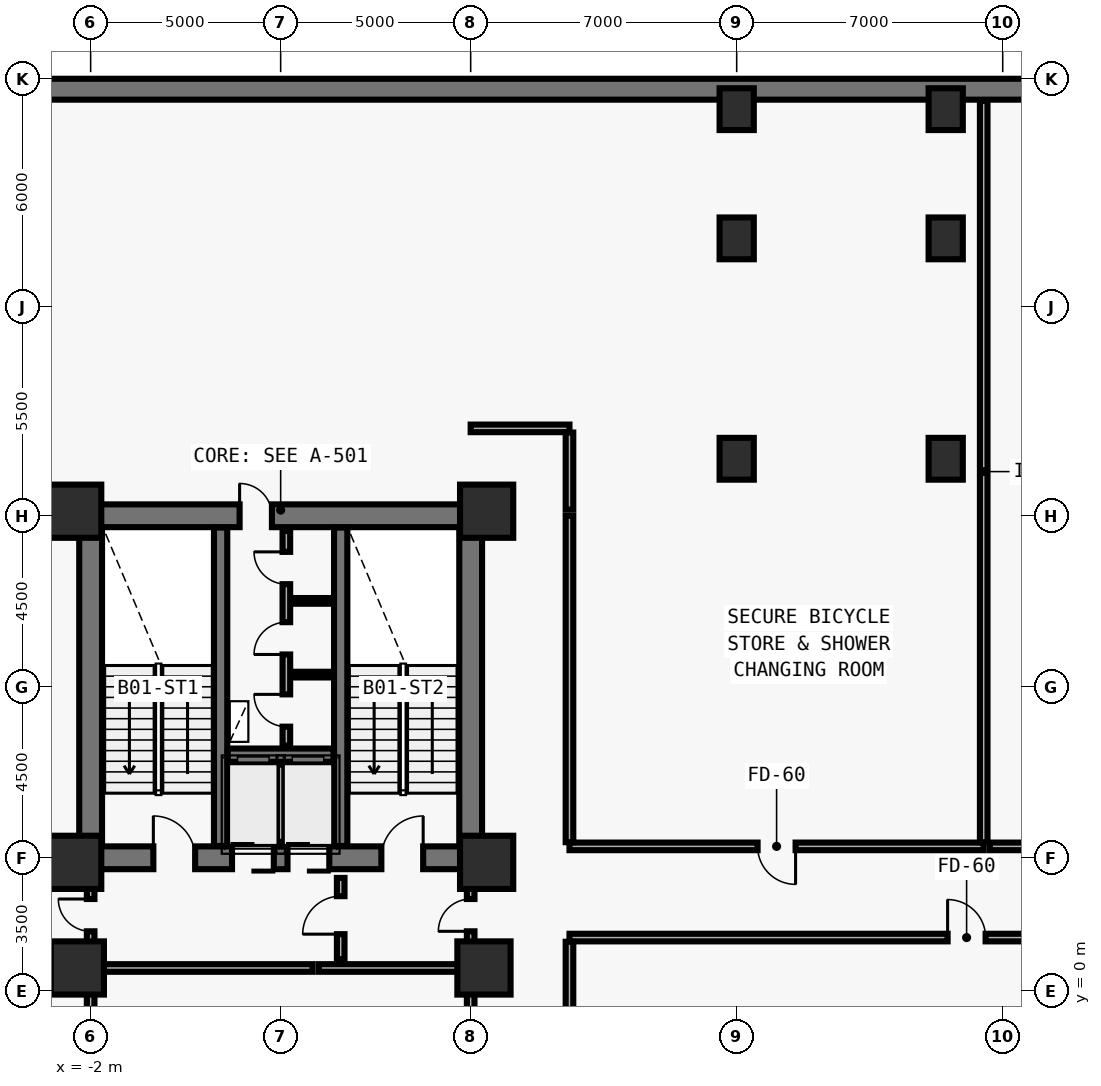
"""IFC4 building model, lengths in metres.
Left out: names, types, materials, properties, quantities, classifications, styles, units other than length and angle.
Written with IfcOpenShell. Run it as: python <this file> out.ifc"""

import sys

from ifc_helpers import new_model, si_unit, direction, frame, frame_2d, origin, origin_2d, place, context, subcontext, project, spatial, rectangle, extrude, element, fill, save


model = new_model("IFC4")
c1 = context("Model", 3, precision=1e-05, world=origin(), true_north=direction((0.0, 1.0)))
c2 = subcontext(c1, "Body", "Model", "MODEL_VIEW")
j1 = project(units=[si_unit("LENGTHUNIT", "METRE"), si_unit("PLANEANGLEUNIT", "RADIAN")], contexts=[c1])
p1 = place(None, origin())
s1 = spatial("IfcSite", under=j1, at=p1, CompositionType="ELEMENT")
p2 = place(p1, origin())
s2 = spatial("IfcBuilding", under=s1, at=p2, CompositionType="ELEMENT")
p3 = place(p2, frame((0.0, 0.0, -4.5)))
s3 = spatial("IfcBuildingStorey", under=s2, at=p3, CompositionType="ELEMENT", Elevation=-4.5)
p4 = place(p3, frame((-2.0, 3.5, 0.0), z_axis=(0.0, 0.0, 1.0), x_axis=(1.0, 0.0, 0.0)))
e1 = element("IfcWall", 1, at=p4, inside=s3, PredefinedType="SHEAR", context=c2, shape_type="SweptSolid", body=[
    extrude(rectangle(XDim=10.0, YDim=0.6, at=frame_2d((5.0, 0.0))), origin(), (0.0, 0.0, 1.0), 4.492),
])
p5 = place(p4, frame((1.65, 0.0, 0.0)))
e2 = element("IfcOpeningElement", 2, at=p5, cuts=e1, PredefinedType="OPENING", context=c2, shape_type="SweptSolid", body=[
    extrude(rectangle(XDim=1.1, YDim=2.15, at=frame_2d((0.55, 1.075))), frame((0.0, 0.31, 0.0), z_axis=(0.0, -1.0, 0.0), x_axis=(1.0, 0.0, 0.0)), (0.0, 0.0, 1.0), 0.62),
])
p6 = place(p4, frame((7.65, 0.0, 0.0)))
e3 = element("IfcOpeningElement", 3, at=p6, cuts=e1, PredefinedType="OPENING", context=c2, shape_type="SweptSolid", body=[
    extrude(rectangle(XDim=1.1, YDim=2.15, at=frame_2d((0.55, 1.075))), frame((0.0, 0.31, 0.0), z_axis=(0.0, -1.0, 0.0), x_axis=(1.0, 0.0, 0.0)), (0.0, 0.0, 1.0), 0.62),
])
p7 = place(p4, frame((3.72, 0.0, 0.0)))
e4 = element("IfcOpeningElement", 4, at=p7, cuts=e1, PredefinedType="OPENING", context=c2, shape_type="SweptSolid", body=[
    extrude(rectangle(XDim=1.1, YDim=2.2, at=frame_2d((0.55, 1.1))), frame((0.0, 0.31, 0.0), z_axis=(0.0, -1.0, 0.0), x_axis=(1.0, 0.0, 0.0)), (0.0, 0.0, 1.0), 0.62),
])
p8 = place(p4, frame((5.18, 0.0, 0.0)))
e5 = element("IfcOpeningElement", 5, at=p8, cuts=e1, PredefinedType="OPENING", context=c2, shape_type="SweptSolid", body=[
    extrude(rectangle(XDim=1.1, YDim=2.2, at=frame_2d((0.55, 1.1))), frame((0.0, 0.31, 0.0), z_axis=(0.0, -1.0, 0.0), x_axis=(1.0, 0.0, 0.0)), (0.0, 0.0, 1.0), 0.62),
])
p9 = place(p3, frame((-2.0, 12.5, 0.0), z_axis=(0.0, 0.0, 1.0), x_axis=(1.0, 0.0, 0.0)))
e6 = element("IfcWall", 6, at=p9, inside=s3, PredefinedType="SHEAR", context=c2, shape_type="SweptSolid", body=[
    extrude(rectangle(XDim=10.0, YDim=0.6, at=frame_2d((5.0, 0.0))), origin(), (0.0, 0.0, 1.0), 4.492),
])
p10 = place(p9, frame((3.92, 0.0, 0.0)))
e7 = element("IfcOpeningElement", 7, at=p10, cuts=e6, PredefinedType="OPENING", context=c2, shape_type="SweptSolid", body=[
    extrude(rectangle(XDim=0.85, YDim=2.1, at=frame_2d((0.425, 1.05))), frame((0.0, 0.31, 0.0), z_axis=(0.0, -1.0, 0.0), x_axis=(1.0, 0.0, 0.0)), (0.0, 0.0, 1.0), 0.62),
])
for number, where, z_axis, x_axis in (
    (8, (-2.0, 3.81, 0.0), (0.0, 0.0, 1.0), (0.0, 1.0, 0.0)),
    (9, (8.0, 3.81, 0.0), (0.0, 0.0, 1.0), (0.0, 1.0, 0.0)),
):
    element("IfcWall", number, at=place(p3, frame(where, z_axis=z_axis, x_axis=x_axis)), inside=s3, PredefinedType="SHEAR", context=c2, shape_type="SweptSolid", body=[
        extrude(rectangle(XDim=8.38, YDim=0.6, at=frame_2d((4.19, 0.0))), origin(), (0.0, 0.0, 1.0), 4.492),
    ])
for number, where, z_axis, x_axis in (
    (10, (1.42, 3.81, 0.0), (0.0, 0.0, 1.0), (0.0, 1.0, 0.0)),
    (11, (4.58, 3.81, 0.0), (0.0, 0.0, 1.0), (0.0, 1.0, 0.0)),
):
    element("IfcWall", number, at=place(p3, frame(where, z_axis=z_axis, x_axis=x_axis)), inside=s3, PredefinedType="SHEAR", context=c2, shape_type="SweptSolid", body=[
        extrude(rectangle(XDim=8.38, YDim=0.35, at=frame_2d((4.19, 0.0))), origin(), (0.0, 0.0, 1.0), 4.492),
    ])
p11 = place(p3, frame((1.61, 6.2, 0.0), z_axis=(0.0, 0.0, 1.0), x_axis=(1.0, 0.0, 0.0)))
e12 = element("IfcWall", 12, at=p11, inside=s3, PredefinedType="SHEAR", context=c2, shape_type="SweptSolid", body=[
    extrude(rectangle(XDim=2.78, YDim=0.35, at=frame_2d((1.39, 0.0))), origin(), (0.0, 0.0, 1.0), 4.492),
])
p12 = place(p3, frame((-33.725, 23.725, 0.0), z_axis=(0.0, 0.0, 1.0), x_axis=(1.0, 0.0, 0.0)))
e13 = element("IfcWall", 13, at=p12, inside=s3, PredefinedType="SOLIDWALL", context=c2, shape_type="SweptSolid", body=[
    extrude(rectangle(XDim=67.45, YDim=0.55, at=frame_2d((33.725, 0.0))), origin(), (0.0, 0.0, 1.0), 4.492),
])
for number, where, z_axis, x_axis in (
    (14, (-2.42, 12.62, 0.0), (0.0, 0.0, 1.0), (1.0, 0.0, 0.0)),
    (15, (8.42, 12.62, 0.0), (0.0, 0.0, 1.0), (1.0, 0.0, 0.0)),
    (16, (-2.42, 3.38, 0.0), (0.0, 0.0, 1.0), (1.0, 0.0, 0.0)),
    (17, (8.42, 3.38, 0.0), (0.0, 0.0, 1.0), (1.0, 0.0, 0.0)),
    (18, (-2.35, 0.6, 0.0), (0.0, 0.0, 1.0), (1.0, 0.0, 0.0)),
    (19, (8.35, 0.6, 0.0), (0.0, 0.0, 1.0), (1.0, 0.0, 0.0)),
):
    element("IfcColumn", number, at=place(p3, frame(where, z_axis=z_axis, x_axis=x_axis)), inside=s3, PredefinedType="COLUMN", context=c2, shape_type="SweptSolid", body=[
        extrude(rectangle(XDim=1.4, YDim=1.4, at=origin_2d()), origin(), (0.0, 0.0, 1.0), 4.475),
    ])
for number, where, z_axis, x_axis in (
    (20, (15.0, 14.0, 0.0), (0.0, 0.0, 1.0), (1.0, 0.0, 0.0)),
    (21, (15.0, 19.8, 0.0), (0.0, 0.0, 1.0), (1.0, 0.0, 0.0)),
    (22, (15.0, 23.2, 0.0), (0.0, 0.0, 1.0), (1.0, 0.0, 0.0)),
    (23, (20.5, 14.0, 0.0), (0.0, 0.0, 1.0), (1.0, 0.0, 0.0)),
    (24, (20.5, 19.8, 0.0), (0.0, 0.0, 1.0), (1.0, 0.0, 0.0)),
    (25, (20.5, 23.2, 0.0), (0.0, 0.0, 1.0), (1.0, 0.0, 0.0)),
):
    element("IfcColumn", number, at=place(p3, frame(where, z_axis=z_axis, x_axis=x_axis)), inside=s3, PredefinedType="COLUMN", context=c2, shape_type="SweptSolid", body=[
        extrude(rectangle(XDim=0.9, YDim=1.1, at=origin_2d()), origin(), (0.0, 0.0, 1.0), 4.475),
    ])
p13 = place(p3, frame((3.0, 3.92, 0.0), z_axis=(0.0, 0.0, 1.0), x_axis=(0.0, 1.0, 0.0)))
e26 = element("IfcWall", 26, at=p13, inside=s3, PredefinedType="SOLIDWALL", context=c2, shape_type="SweptSolid", body=[
    extrude(rectangle(XDim=2.03, YDim=0.2, at=frame_2d((1.015, 0.0))), origin(), (0.0, 0.0, 1.0), 4.18),
])
p14 = place(p3, frame((4.0, 0.6, 0.0), z_axis=(0.0, 0.0, 1.0), x_axis=(1.0, 0.0, 0.0)))
e27 = element("IfcWall", 27, at=p14, inside=s3, PredefinedType="SOLIDWALL", context=c2, shape_type="SweptSolid", body=[
    extrude(rectangle(XDim=3.88, YDim=0.2, at=frame_2d((1.94, 0.0))), origin(), (0.0, 0.0, 1.0), 3.362),
])
p15 = place(p3, frame((3.15, 6.45, 0.0), z_axis=(0.0, 0.0, 1.0), x_axis=(0.0, 1.0, 0.0)))
e28 = element("IfcWall", 28, at=p15, inside=s3, PredefinedType="MOVABLE", context=c2, shape_type="SweptSolid", body=[
    extrude(rectangle(XDim=5.65, YDim=0.2, at=frame_2d((2.825, 0.0))), origin(), (0.0, 0.0, 1.0), 4.18),
])
p16 = place(p15, frame((0.5, 0.0, 0.0)))
e29 = element("IfcOpeningElement", 29, at=p16, cuts=e28, PredefinedType="OPENING", context=c2, shape_type="SweptSolid", body=[
    extrude(rectangle(XDim=0.85, YDim=2.1, at=frame_2d((0.425, 1.05))), frame((0.0, 0.11, 0.0), z_axis=(0.0, -1.0, 0.0), x_axis=(1.0, 0.0, 0.0)), (0.0, 0.0, 1.0), 0.22),
])
p17 = place(p15, frame((2.4, 0.0, 0.0)))
e30 = element("IfcOpeningElement", 30, at=p17, cuts=e28, PredefinedType="OPENING", context=c2, shape_type="SweptSolid", body=[
    extrude(rectangle(XDim=0.85, YDim=2.1, at=frame_2d((0.425, 1.05))), frame((0.0, 0.11, 0.0), z_axis=(0.0, -1.0, 0.0), x_axis=(1.0, 0.0, 0.0)), (0.0, 0.0, 1.0), 0.22),
])
p18 = place(p15, frame((4.25, 0.0, 0.0)))
e31 = element("IfcOpeningElement", 31, at=p18, cuts=e28, PredefinedType="OPENING", context=c2, shape_type="SweptSolid", body=[
    extrude(rectangle(XDim=0.85, YDim=2.1, at=frame_2d((0.425, 1.05))), frame((0.0, 0.11, 0.0), z_axis=(0.0, -1.0, 0.0), x_axis=(1.0, 0.0, 0.0)), (0.0, 0.0, 1.0), 0.22),
])
p19 = place(p3, frame((4.58, 0.83, 0.0), z_axis=(0.0, 0.0, 1.0), x_axis=(0.0, 1.0, 0.0)))
e32 = element("IfcWall", 32, at=p19, inside=s3, PredefinedType="MOVABLE", context=c2, shape_type="SweptSolid", body=[
    extrude(rectangle(XDim=2.14, YDim=0.2, at=frame_2d((1.07, 0.0))), origin(), (0.0, 0.0, 1.0), 4.18),
])
p20 = place(p19, frame((0.66, 0.0, 0.0)))
e33 = element("IfcOpeningElement", 33, at=p20, cuts=e32, PredefinedType="OPENING", context=c2, shape_type="SweptSolid", body=[
    extrude(rectangle(XDim=1.0, YDim=2.1, at=frame_2d((0.5, 1.05))), frame((0.0, 0.11, 0.0), z_axis=(0.0, -1.0, 0.0), x_axis=(1.0, 0.0, 0.0)), (0.0, 0.0, 1.0), 0.22),
])
p21 = place(p3, frame((-2.0, 0.72, 0.0), z_axis=(0.0, 0.0, 1.0), x_axis=(0.0, 1.0, 0.0)))
e34 = element("IfcWall", 34, at=p21, inside=s3, PredefinedType="MOVABLE", context=c2, shape_type="SweptSolid", body=[
    extrude(rectangle(XDim=2.25, YDim=0.2, at=frame_2d((1.125, 0.0))), origin(), (0.0, 0.0, 1.0), 3.262),
])
p22 = place(p21, frame((0.845, 0.0, 0.0)))
e35 = element("IfcOpeningElement", 35, at=p22, cuts=e34, PredefinedType="OPENING", context=c2, shape_type="SweptSolid", body=[
    extrude(rectangle(XDim=0.85, YDim=2.1, at=frame_2d((0.425, 1.05))), frame((0.0, 0.11, 0.0), z_axis=(0.0, -1.0, 0.0), x_axis=(1.0, 0.0, 0.0)), (0.0, 0.0, 1.0), 0.22),
])
p23 = place(p3, frame((8.0, 0.72, 0.0), z_axis=(0.0, 0.0, 1.0), x_axis=(0.0, 1.0, 0.0)))
e36 = element("IfcWall", 36, at=p23, inside=s3, PredefinedType="MOVABLE", context=c2, shape_type="SweptSolid", body=[
    extrude(rectangle(XDim=2.25, YDim=0.2, at=frame_2d((1.125, 0.0))), origin(), (0.0, 0.0, 1.0), 3.262),
])
p24 = place(p23, frame((0.845, 0.0, 0.0)))
e37 = element("IfcOpeningElement", 37, at=p24, cuts=e36, PredefinedType="OPENING", context=c2, shape_type="SweptSolid", body=[
    extrude(rectangle(XDim=0.85, YDim=2.1, at=frame_2d((0.425, 1.05))), frame((0.0, 0.11, 0.0), z_axis=(0.0, -1.0, 0.0), x_axis=(1.0, 0.0, 0.0)), (0.0, 0.0, 1.0), 0.22),
])
p25 = place(p3, frame((10.6, 1.4, 0.0), z_axis=(0.0, 0.0, 1.0), x_axis=(1.0, 0.0, 0.0)))
e38 = element("IfcWall", 38, at=p25, inside=s3, PredefinedType="MOVABLE", context=c2, shape_type="SweptSolid", body=[
    extrude(rectangle(XDim=20.9, YDim=0.2, at=frame_2d((10.45, 0.0))), origin(), (0.0, 0.0, 1.0), 4.18),
])
p26 = place(p25, frame((9.95, 0.0, 0.0)))
e39 = element("IfcOpeningElement", 39, at=p26, cuts=e38, PredefinedType="OPENING", context=c2, shape_type="SweptSolid", body=[
    extrude(rectangle(XDim=1.0, YDim=2.1, at=frame_2d((0.5, 1.05))), frame((0.0, 0.11, 0.0), z_axis=(0.0, -1.0, 0.0), x_axis=(1.0, 0.0, 0.0)), (0.0, 0.0, 1.0), 0.22),
])
p27 = place(p3, frame((21.5, 3.8, 0.0), z_axis=(0.0, 0.0, 1.0), x_axis=(-1.0, 0.0, 0.0)))
e40 = element("IfcWall", 40, at=p27, inside=s3, PredefinedType="MOVABLE", context=c2, shape_type="SweptSolid", body=[
    extrude(rectangle(XDim=10.9, YDim=0.2, at=frame_2d((5.45, 0.0))), origin(), (0.0, 0.0, 1.0), 4.18),
])
p28 = place(p27, frame((4.95, 0.0, 0.0)))
e41 = element("IfcOpeningElement", 41, at=p28, cuts=e40, PredefinedType="OPENING", context=c2, shape_type="SweptSolid", body=[
    extrude(rectangle(XDim=1.0, YDim=2.1, at=frame_2d((0.5, 1.05))), frame((0.0, 0.11, 0.0), z_axis=(0.0, -1.0, 0.0), x_axis=(1.0, 0.0, 0.0)), (0.0, 0.0, 1.0), 0.22),
])
p29 = place(p3, frame((31.5, 3.8, 0.0), z_axis=(0.0, 0.0, 1.0), x_axis=(-1.0, 0.0, 0.0)))
e42 = element("IfcWall", 42, at=p29, inside=s3, PredefinedType="MOVABLE", context=c2, shape_type="SweptSolid", body=[
    extrude(rectangle(XDim=9.84, YDim=0.2, at=frame_2d((4.92, 0.0))), origin(), (0.0, 0.0, 1.0), 4.18),
])
p30 = place(p29, frame((4.5, 0.0, 0.0)))
e43 = element("IfcOpeningElement", 43, at=p30, cuts=e42, PredefinedType="OPENING", context=c2, shape_type="SweptSolid", body=[
    extrude(rectangle(XDim=1.0, YDim=2.1, at=frame_2d((0.5, 1.05))), frame((0.0, 0.11, 0.0), z_axis=(0.0, -1.0, 0.0), x_axis=(1.0, 0.0, 0.0)), (0.0, 0.0, 1.0), 0.22),
])
for number, where, z_axis, x_axis in (
    (44, (3.37, 8.32, 0.0), (0.0, 0.0, 1.0), (1.0, 0.0, 0.0)),
    (45, (3.37, 10.26, 0.0), (0.0, 0.0, 1.0), (1.0, 0.0, 0.0)),
):
    element("IfcWall", number, at=place(p3, frame(where, z_axis=z_axis, x_axis=x_axis)), inside=s3, PredefinedType="PARTITIONING", context=c2, shape_type="SweptSolid", body=[
        extrude(rectangle(XDim=0.98, YDim=0.15, at=frame_2d((0.49, 0.0))), origin(), (0.0, 0.0, 1.0), 4.18),
    ])
p31 = place(p3, frame((-1.88, 0.6, 0.0), z_axis=(0.0, 0.0, 1.0), x_axis=(1.0, 0.0, 0.0)))
e46 = element("IfcWall", 46, at=p31, inside=s3, PredefinedType="MOVABLE", context=c2, shape_type="SweptSolid", body=[
    extrude(rectangle(XDim=5.72, YDim=0.2, at=frame_2d((2.86, 0.0))), origin(), (0.0, 0.0, 1.0), 3.362),
])
for number, where, z_axis, x_axis in (
    (47, (-2.0, -4.09, 0.0), (0.0, 0.0, 1.0), (0.0, 1.0, 0.0)),
    (48, (8.0, -4.09, 0.0), (0.0, 0.0, 1.0), (0.0, 1.0, 0.0)),
):
    element("IfcWall", number, at=place(p3, frame(where, z_axis=z_axis, x_axis=x_axis)), inside=s3, PredefinedType="MOVABLE", context=c2, shape_type="SweptSolid", body=[
        extrude(rectangle(XDim=4.59, YDim=0.2, at=frame_2d((2.295, 0.0))), origin(), (0.0, 0.0, 1.0), 3.362),
    ])
p32 = place(p3, frame((10.6, -4.2, 0.0), z_axis=(0.0, 0.0, 1.0), x_axis=(0.0, 1.0, 0.0)))
e49 = element("IfcWall", 49, at=p32, inside=s3, PredefinedType="MOVABLE", context=c2, shape_type="SweptSolid", body=[
    extrude(rectangle(XDim=5.49, YDim=0.2, at=frame_2d((2.745, 0.0))), origin(), (0.0, 0.0, 1.0), 4.18),
])
p33 = place(p3, frame((-2.36, 3.8, 0.0), z_axis=(0.0, 0.0, 1.0), x_axis=(-1.0, 0.0, 0.0)))
e50 = element("IfcWall", 50, at=p33, inside=s3, PredefinedType="MOVABLE", context=c2, shape_type="SweptSolid", body=[
    extrude(rectangle(XDim=2.08, YDim=0.2, at=frame_2d((1.04, 0.0))), origin(), (0.0, 0.0, 1.0), 4.18),
])
p34 = place(p3, frame((10.6, 3.91, 0.0), z_axis=(0.0, 0.0, 1.0), x_axis=(0.0, 1.0, 0.0)))
e51 = element("IfcWall", 51, at=p34, inside=s3, PredefinedType="MOVABLE", context=c2, shape_type="SweptSolid", body=[
    extrude(rectangle(XDim=8.59, YDim=0.2, at=frame_2d((4.295, 0.0))), origin(), (0.0, 0.0, 1.0), 4.18),
])
p35 = place(p3, frame((10.6, 14.8, 0.0), z_axis=(0.0, 0.0, 1.0), x_axis=(-1.0, 0.0, 0.0)))
e52 = element("IfcWall", 52, at=p35, inside=s3, PredefinedType="MOVABLE", context=c2, shape_type="SweptSolid", body=[
    extrude(rectangle(XDim=2.6, YDim=0.2, at=frame_2d((1.3, 0.0))), origin(), (0.0, 0.0, 1.0), 4.18),
])
p36 = place(p3, frame((10.6, 12.66, 0.0), z_axis=(0.0, 0.0, 1.0), x_axis=(0.0, 1.0, 0.0)))
e53 = element("IfcWall", 53, at=p36, inside=s3, PredefinedType="MOVABLE", context=c2, shape_type="SweptSolid", body=[
    extrude(rectangle(XDim=2.03, YDim=0.2, at=frame_2d((1.015, 0.0))), origin(), (0.0, 0.0, 1.0), 4.18),
])
p37 = place(p3, frame((21.5, 23.415, 0.0), z_axis=(0.0, 0.0, 1.0), x_axis=(0.0, -1.0, 0.0)))
e54 = element("IfcWall", 54, at=p37, inside=s3, PredefinedType="MOVABLE", context=c2, shape_type="SweptSolid", body=[
    extrude(rectangle(XDim=19.505, YDim=0.2, at=frame_2d((9.752, 0.0))), origin(), (0.0, 0.0, 1.0), 4.18),
])
p38 = place(p5, origin())
e55 = element("IfcDoor", 55, at=p38, inside=s3, OperationType="SINGLE_SWING_LEFT", PredefinedType="DOOR", context=c2, shape_type="SweptSolid", body=[
    extrude(rectangle(XDim=1.1, YDim=2.15, at=frame_2d((0.55, 1.075))), frame((0.0, 0.025, 0.0), z_axis=(0.0, -1.0, 0.0), x_axis=(1.0, 0.0, 0.0)), (0.0, 0.0, 1.0), 0.05),
])
fill(e2, e55)
p39 = place(p6, origin())
e56 = element("IfcDoor", 56, at=p39, inside=s3, OperationType="SINGLE_SWING_RIGHT", PredefinedType="DOOR", context=c2, shape_type="SweptSolid", body=[
    extrude(rectangle(XDim=1.1, YDim=2.15, at=frame_2d((0.55, 1.075))), frame((0.0, 0.025, 0.0), z_axis=(0.0, -1.0, 0.0), x_axis=(1.0, 0.0, 0.0)), (0.0, 0.0, 1.0), 0.05),
])
fill(e3, e56)
p40 = place(p7, origin())
e57 = element("IfcDoor", 57, at=p40, inside=s3, OperationType="DOUBLE_DOOR_SLIDING", PredefinedType="DOOR", context=c2, shape_type="SweptSolid", body=[
    extrude(rectangle(XDim=1.1, YDim=2.2, at=frame_2d((0.55, 1.1))), frame((0.0, 0.025, 0.0), z_axis=(0.0, -1.0, 0.0), x_axis=(1.0, 0.0, 0.0)), (0.0, 0.0, 1.0), 0.05),
])
fill(e4, e57)
p41 = place(p8, origin())
e58 = element("IfcDoor", 58, at=p41, inside=s3, OperationType="DOUBLE_DOOR_SLIDING", PredefinedType="DOOR", context=c2, shape_type="SweptSolid", body=[
    extrude(rectangle(XDim=1.1, YDim=2.2, at=frame_2d((0.55, 1.1))), frame((0.0, 0.025, 0.0), z_axis=(0.0, -1.0, 0.0), x_axis=(1.0, 0.0, 0.0)), (0.0, 0.0, 1.0), 0.05),
])
fill(e5, e58)
p42 = place(p10, origin())
e59 = element("IfcDoor", 59, at=p42, inside=s3, OperationType="SINGLE_SWING_LEFT", PredefinedType="DOOR", context=c2, shape_type="SweptSolid", body=[
    extrude(rectangle(XDim=0.85, YDim=2.1, at=frame_2d((0.425, 1.05))), frame((0.0, 0.025, 0.0), z_axis=(0.0, -1.0, 0.0), x_axis=(1.0, 0.0, 0.0)), (0.0, 0.0, 1.0), 0.05),
])
fill(e7, e59)
p43 = place(p16, origin())
e60 = element("IfcDoor", 60, at=p43, inside=s3, OperationType="SINGLE_SWING_RIGHT", PredefinedType="DOOR", context=c2, shape_type="SweptSolid", body=[
    extrude(rectangle(XDim=0.85, YDim=2.1, at=frame_2d((0.425, 1.05))), frame((0.0, 0.025, 0.0), z_axis=(0.0, -1.0, 0.0), x_axis=(1.0, 0.0, 0.0)), (0.0, 0.0, 1.0), 0.05),
])
fill(e29, e60)
p44 = place(p17, origin())
e61 = element("IfcDoor", 61, at=p44, inside=s3, OperationType="SINGLE_SWING_LEFT", PredefinedType="DOOR", context=c2, shape_type="SweptSolid", body=[
    extrude(rectangle(XDim=0.85, YDim=2.1, at=frame_2d((0.425, 1.05))), frame((0.0, 0.025, 0.0), z_axis=(0.0, -1.0, 0.0), x_axis=(1.0, 0.0, 0.0)), (0.0, 0.0, 1.0), 0.05),
])
fill(e30, e61)
p45 = place(p18, origin())
e62 = element("IfcDoor", 62, at=p45, inside=s3, OperationType="SINGLE_SWING_RIGHT", PredefinedType="DOOR", context=c2, shape_type="SweptSolid", body=[
    extrude(rectangle(XDim=0.85, YDim=2.1, at=frame_2d((0.425, 1.05))), frame((0.0, 0.025, 0.0), z_axis=(0.0, -1.0, 0.0), x_axis=(1.0, 0.0, 0.0)), (0.0, 0.0, 1.0), 0.05),
])
fill(e31, e62)
p46 = place(p20, origin())
e63 = element("IfcDoor", 63, at=p46, inside=s3, OperationType="SINGLE_SWING_LEFT", PredefinedType="DOOR", context=c2, shape_type="SweptSolid", body=[
    extrude(rectangle(XDim=1.0, YDim=2.1, at=frame_2d((0.5, 1.05))), frame((0.0, 0.025, 0.0), z_axis=(0.0, -1.0, 0.0), x_axis=(1.0, 0.0, 0.0)), (0.0, 0.0, 1.0), 0.05),
])
fill(e33, e63)
p47 = place(p22, origin())
e64 = element("IfcDoor", 64, at=p47, inside=s3, OperationType="SINGLE_SWING_RIGHT", PredefinedType="DOOR", context=c2, shape_type="SweptSolid", body=[
    extrude(rectangle(XDim=0.85, YDim=2.1, at=frame_2d((0.425, 1.05))), frame((0.0, 0.025, 0.0), z_axis=(0.0, -1.0, 0.0), x_axis=(1.0, 0.0, 0.0)), (0.0, 0.0, 1.0), 0.05),
])
fill(e35, e64)
p48 = place(p24, origin())
e65 = element("IfcDoor", 65, at=p48, inside=s3, OperationType="SINGLE_SWING_LEFT", PredefinedType="DOOR", context=c2, shape_type="SweptSolid", body=[
    extrude(rectangle(XDim=0.85, YDim=2.1, at=frame_2d((0.425, 1.05))), frame((0.0, 0.025, 0.0), z_axis=(0.0, -1.0, 0.0), x_axis=(1.0, 0.0, 0.0)), (0.0, 0.0, 1.0), 0.05),
])
fill(e37, e65)
p49 = place(p26, origin())
e66 = element("IfcDoor", 66, at=p49, inside=s3, OperationType="SINGLE_SWING_LEFT", PredefinedType="DOOR", context=c2, shape_type="SweptSolid", body=[
    extrude(rectangle(XDim=1.0, YDim=2.1, at=frame_2d((0.5, 1.05))), frame((0.0, 0.025, 0.0), z_axis=(0.0, -1.0, 0.0), x_axis=(1.0, 0.0, 0.0)), (0.0, 0.0, 1.0), 0.05),
])
fill(e39, e66)
p50 = place(p28, origin())
e67 = element("IfcDoor", 67, at=p50, inside=s3, OperationType="SINGLE_SWING_LEFT", PredefinedType="DOOR", context=c2, shape_type="SweptSolid", body=[
    extrude(rectangle(XDim=1.0, YDim=2.1, at=frame_2d((0.5, 1.05))), frame((0.0, 0.025, 0.0), z_axis=(0.0, -1.0, 0.0), x_axis=(1.0, 0.0, 0.0)), (0.0, 0.0, 1.0), 0.05),
])
fill(e41, e67)
save(model, sys.argv[1])
